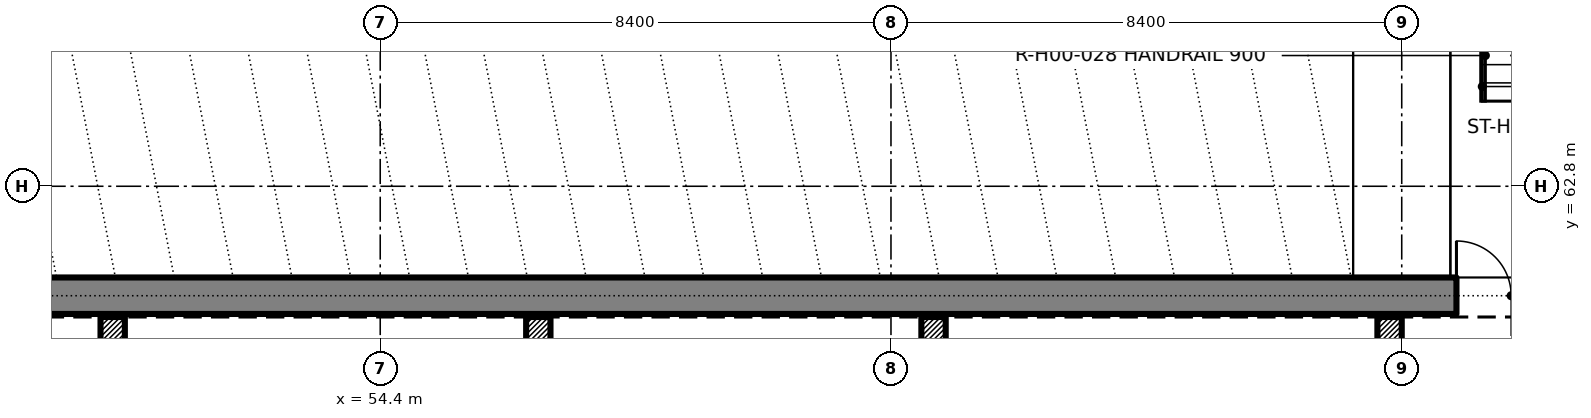
"""IFC4 building model, lengths in metres.
Left out: names, types, materials, properties, quantities, classifications, styles, units other than length and angle.
Written with IfcOpenShell. Run it as: python <this file> out.ifc"""

import sys

from ifc_helpers import new_model, si_unit, direction, frame, frame_2d, origin, origin_2d, place, context, subcontext, project, spatial, rectangle, extrude, element, fill, save


model = new_model("IFC4")
c1 = context("Model", 3, precision=1e-05, world=origin(), true_north=direction((0.0, 1.0)))
c2 = subcontext(c1, "Body", "Model", "MODEL_VIEW")
j1 = project(units=[si_unit("LENGTHUNIT", "METRE"), si_unit("PLANEANGLEUNIT", "RADIAN")], contexts=[c1])
p1 = place(None, origin())
s1 = spatial("IfcSite", under=j1, at=p1, CompositionType="ELEMENT")
p2 = place(p1, origin())
s2 = spatial("IfcBuilding", under=s1, at=p2, CompositionType="ELEMENT")
p3 = place(p2, origin())
s3 = spatial("IfcBuildingStorey", under=s2, at=p3, CompositionType="ELEMENT", Elevation=0.0)
p4 = place(p3, frame((36.5, 61.0, 0.0), z_axis=(0.0, 0.0, 1.0), x_axis=(1.0, 0.0, 0.0)))
e1 = element("IfcWall", 1, at=p4, inside=s3, PredefinedType="SOLIDWALL", context=c2, shape_type="SweptSolid", body=[
    extrude(rectangle(XDim=52.6, YDim=0.6, at=frame_2d((26.3, 0.0))), origin(), (0.0, 0.0, 1.0), 5.4),
])
p5 = place(p4, frame((35.6, 0.0, 0.0)))
e2 = element("IfcOpeningElement", 2, at=p5, cuts=e1, PredefinedType="OPENING", context=c2, shape_type="SweptSolid", body=[
    extrude(rectangle(XDim=1.8, YDim=2.1, at=frame_2d((0.9, 1.05))), frame((0.0, 0.31, 0.0), z_axis=(0.0, -1.0, 0.0), x_axis=(1.0, 0.0, 0.0)), (0.0, 0.0, 1.0), 0.62),
])
p6 = place(p4, frame((39.6, 0.0, 0.0)))
e3 = element("IfcOpeningElement", 3, at=p6, cuts=e1, PredefinedType="OPENING", context=c2, shape_type="SweptSolid", body=[
    extrude(rectangle(XDim=1.8, YDim=2.1, at=frame_2d((0.9, 1.05))), frame((0.0, 0.31, 0.0), z_axis=(0.0, -1.0, 0.0), x_axis=(1.0, 0.0, 0.0)), (0.0, 0.0, 1.0), 0.62),
])
for number, where, z_axis, x_axis in (
    (4, (50.0, 60.45, 0.0), (0.0, 0.0, 1.0), (1.0, 0.0, 0.0)),
    (5, (57.0, 60.45, 0.0), (0.0, 0.0, 1.0), (1.0, 0.0, 0.0)),
    (6, (63.5, 60.45, 0.0), (0.0, 0.0, 1.0), (1.0, 0.0, 0.0)),
    (7, (71.0, 60.45, 0.0), (0.0, 0.0, 1.0), (1.0, 0.0, 0.0)),
):
    element("IfcColumn", number, at=place(p3, frame(where, z_axis=z_axis, x_axis=x_axis)), inside=s3, PredefinedType="COLUMN", context=c2, shape_type="SweptSolid", body=[
        extrude(rectangle(XDim=0.4, YDim=0.4, at=origin_2d()), origin(), (0.0, 0.0, 1.0), 5.4),
    ])
for number, where, z_axis, x_axis in (
    (8, (48.48, 61.0, -0.3), (0.0, 0.0, 1.0), (1.0, 0.0, 0.0)),
    (9, (55.48, 61.0, -0.3), (0.0, 0.0, 1.0), (1.0, 0.0, 0.0)),
    (10, (61.98, 61.0, -0.3), (0.0, 0.0, 1.0), (1.0, 0.0, 0.0)),
    (11, (69.48, 61.0, -0.3), (0.0, 0.0, 1.0), (1.0, 0.0, 0.0)),
):
    element("IfcWall", number, at=place(p3, frame(where, z_axis=z_axis, x_axis=x_axis)), inside=s3, PredefinedType="SOLIDWALL", context=c2, shape_type="SweptSolid", body=[
        extrude(rectangle(XDim=3.04, YDim=0.6, at=frame_2d((1.52, 0.0))), origin(), (0.0, 0.0, 1.0), 0.3),
    ])
p7 = place(p3, frame((51.52, 61.0, -0.3), z_axis=(0.0, 0.0, 1.0), x_axis=(1.0, 0.0, 0.0)))
e12 = element("IfcWall", 12, at=p7, inside=s3, PredefinedType="SOLIDWALL", context=c2, shape_type="SweptSolid", body=[
    extrude(rectangle(XDim=3.96, YDim=0.6, at=frame_2d((1.98, 0.0))), origin(), (0.0, 0.0, 1.0), 0.3),
])
p8 = place(p3, frame((58.52, 61.0, -0.3), z_axis=(0.0, 0.0, 1.0), x_axis=(1.0, 0.0, 0.0)))
e13 = element("IfcWall", 13, at=p8, inside=s3, PredefinedType="SOLIDWALL", context=c2, shape_type="SweptSolid", body=[
    extrude(rectangle(XDim=3.46, YDim=0.6, at=frame_2d((1.73, 0.0))), origin(), (0.0, 0.0, 1.0), 0.3),
])
p9 = place(p3, frame((65.02, 61.0, -0.3), z_axis=(0.0, 0.0, 1.0), x_axis=(1.0, 0.0, 0.0)))
e14 = element("IfcWall", 14, at=p9, inside=s3, PredefinedType="SOLIDWALL", context=c2, shape_type="SweptSolid", body=[
    extrude(rectangle(XDim=4.46, YDim=0.6, at=frame_2d((2.23, 0.0))), origin(), (0.0, 0.0, 1.0), 0.3),
])
p10 = place(p3, frame((72.52, 61.0, -0.3), z_axis=(0.0, 0.0, 1.0), x_axis=(1.0, 0.0, 0.0)))
e15 = element("IfcWall", 15, at=p10, inside=s3, PredefinedType="SOLIDWALL", context=c2, shape_type="SweptSolid", body=[
    extrude(rectangle(XDim=5.56, YDim=0.6, at=frame_2d((2.78, 0.0))), origin(), (0.0, 0.0, 1.0), 0.3),
])
p11 = place(p3, frame((55.1, 62.3, -0.3), z_axis=(0.0, 0.0, 1.0), x_axis=(1.0, 0.0, 0.0)))
e16 = element("IfcColumn", 16, at=p11, inside=s3, PredefinedType="COLUMN", context=c2, shape_type="SweptSolid", body=[
    extrude(rectangle(XDim=0.7, YDim=0.7, at=origin_2d()), origin(), (0.0, 0.0, 1.0), 0.729),
])
p12 = place(p3, frame((55.9, 62.3, -0.3), z_axis=(0.0, 0.0, 1.0), x_axis=(1.0, 0.0, 0.0)))
e17 = element("IfcColumn", 17, at=p12, inside=s3, PredefinedType="COLUMN", context=c2, shape_type="SweptSolid", body=[
    extrude(rectangle(XDim=0.7, YDim=0.7, at=origin_2d()), origin(), (0.0, 0.0, 1.0), 1.171),
])
p13 = place(p3, frame((63.35, 62.3, -0.805), z_axis=(0.0, 0.0, 1.0), x_axis=(1.0, 0.0, 0.0)))
e18 = element("IfcColumn", 18, at=p13, inside=s3, PredefinedType="COLUMN", context=c2, shape_type="SweptSolid", body=[
    extrude(rectangle(XDim=0.7, YDim=0.7, at=origin_2d()), origin(), (0.0, 0.0, 1.0), 0.634),
])
p14 = place(p3, frame((64.15, 62.3, -0.805), z_axis=(0.0, 0.0, 1.0), x_axis=(1.0, 0.0, 0.0)))
e19 = element("IfcColumn", 19, at=p14, inside=s3, PredefinedType="COLUMN", context=c2, shape_type="SweptSolid", body=[
    extrude(rectangle(XDim=0.7, YDim=0.7, at=origin_2d()), origin(), (0.0, 0.0, 1.0), 1.076),
])
p15 = place(p5, origin())
e20 = element("IfcDoor", 20, at=p15, inside=s3, OperationType="DOUBLE_DOOR_SINGLE_SWING", PredefinedType="DOOR", context=c2, shape_type="SweptSolid", body=[
    extrude(rectangle(XDim=1.8, YDim=2.1, at=frame_2d((0.9, 1.05))), frame((0.0, 0.025, 0.0), z_axis=(0.0, -1.0, 0.0), x_axis=(1.0, 0.0, 0.0)), (0.0, 0.0, 1.0), 0.05),
])
fill(e2, e20)
save(model, sys.argv[1])
